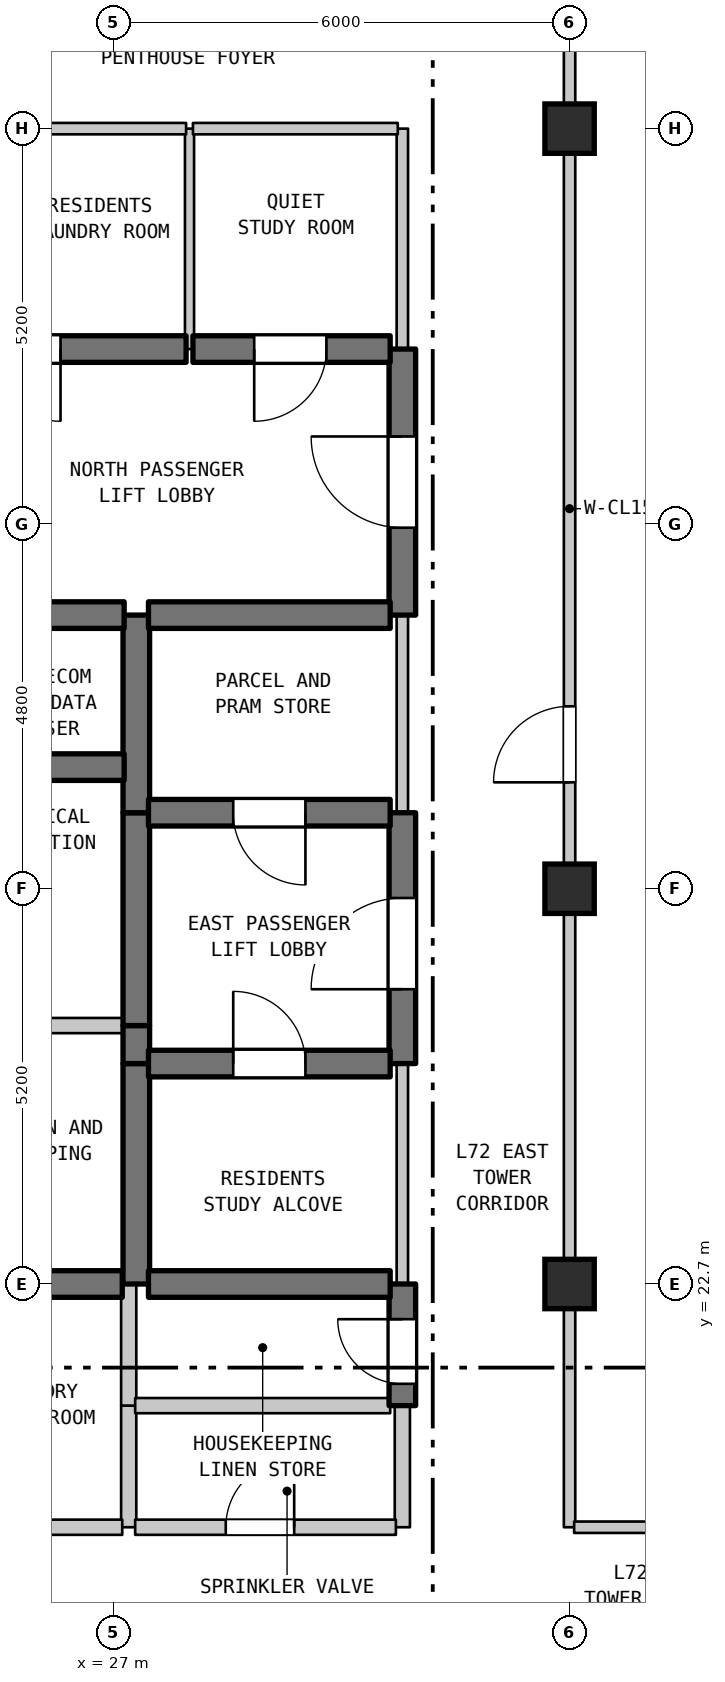
"""IFC4 building model, lengths in metres.
Left out: names, types, materials, properties, quantities, classifications, styles, units other than length and angle.
Written with IfcOpenShell. Run it as: python <this file> out.ifc"""

import sys

from ifc_helpers import new_model, si_unit, direction, frame, frame_2d, origin, origin_2d, place, context, subcontext, project, spatial, rectangle, extrude, element, fill, save


model = new_model("IFC4")
c1 = context("Model", 3, precision=1e-05, world=origin(), true_north=direction((0.0, 1.0)))
c2 = subcontext(c1, "Body", "Model", "MODEL_VIEW")
j1 = project(units=[si_unit("LENGTHUNIT", "METRE"), si_unit("PLANEANGLEUNIT", "RADIAN")], contexts=[c1])
p1 = place(None, origin())
s1 = spatial("IfcSite", under=j1, at=p1, CompositionType="ELEMENT")
p2 = place(p1, origin())
s2 = spatial("IfcBuilding", under=s1, at=p2, CompositionType="ELEMENT")
p3 = place(p2, frame((0.0, 0.0, 288.0)))
s3 = spatial("IfcBuildingStorey", under=s2, at=p3, CompositionType="ELEMENT", Elevation=288.0)
for number, where, z_axis, x_axis in (
    (1, (33.0, 22.7, 0.0), (0.0, 0.0, 1.0), (1.0, 0.0, 0.0)),
    (2, (33.0, 27.9, 0.0), (0.0, 0.0, 1.0), (1.0, 0.0, 0.0)),
    (3, (33.0, 37.9, 0.0), (0.0, 0.0, 1.0), (1.0, 0.0, 0.0)),
):
    element("IfcColumn", number, at=place(p3, frame(where, z_axis=z_axis, x_axis=x_axis)), inside=s3, PredefinedType="COLUMN", context=c2, shape_type="SweptSolid", body=[
        extrude(rectangle(XDim=0.65, YDim=0.65, at=origin_2d()), origin(), (0.0, 0.0, 1.0), 3.7),
    ])
p4 = place(p3, frame((27.2, 19.5, 0.0), z_axis=(0.0, 0.0, 1.0), x_axis=(0.0, 1.0, 0.0)))
e4 = element("IfcWall", 4, at=p4, inside=s3, PredefinedType="STANDARD", context=c2, shape_type="SweptSolid", body=[
    extrude(rectangle(XDim=1.6, YDim=0.2, at=frame_2d((0.8, 0.0))), origin(), (0.0, 0.0, 1.0), 3.39),
])
p5 = place(p3, frame((27.2, 21.1, 0.0), z_axis=(0.0, 0.0, 1.0), x_axis=(0.0, 1.0, 0.0)))
e5 = element("IfcWall", 5, at=p5, inside=s3, PredefinedType="STANDARD", context=c2, shape_type="SweptSolid", body=[
    extrude(rectangle(XDim=1.6, YDim=0.2, at=frame_2d((0.8, 0.0))), origin(), (0.0, 0.0, 1.0), 3.39),
])
p6 = place(p3, frame((27.3, 22.7, 0.0), z_axis=(0.0, 0.0, 1.0), x_axis=(0.0, 1.0, 0.0)))
e6 = element("IfcWall", 6, at=p6, inside=s3, PredefinedType="SHEAR", context=c2, shape_type="SweptSolid", body=[
    extrude(rectangle(XDim=2.9, YDim=0.35, at=frame_2d((1.45, 0.0))), origin(), (0.0, 0.0, 1.0), 3.39),
])
p7 = place(p3, frame((27.3, 25.6, 0.0), z_axis=(0.0, 0.0, 1.0), x_axis=(0.0, 1.0, 0.0)))
e7 = element("IfcWall", 7, at=p7, inside=s3, PredefinedType="SHEAR", context=c2, shape_type="SweptSolid", body=[
    extrude(rectangle(XDim=0.5, YDim=0.35, at=frame_2d((0.25, 0.0))), origin(), (0.0, 0.0, 1.0), 3.39),
])
p8 = place(p3, frame((27.3, 26.1, 0.0), z_axis=(0.0, 0.0, 1.0), x_axis=(0.0, 1.0, 0.0)))
e8 = element("IfcWall", 8, at=p8, inside=s3, PredefinedType="SHEAR", context=c2, shape_type="SweptSolid", body=[
    extrude(rectangle(XDim=2.8, YDim=0.35, at=frame_2d((1.4, 0.0))), origin(), (0.0, 0.0, 1.0), 3.39),
])
p9 = place(p3, frame((27.3, 28.9, 0.0), z_axis=(0.0, 0.0, 1.0), x_axis=(0.0, 1.0, 0.0)))
e9 = element("IfcWall", 9, at=p9, inside=s3, PredefinedType="SHEAR", context=c2, shape_type="SweptSolid", body=[
    extrude(rectangle(XDim=2.6, YDim=0.35, at=frame_2d((1.3, 0.0))), origin(), (0.0, 0.0, 1.0), 3.39),
])
p10 = place(p3, frame((28.0, 35.0, 0.0), z_axis=(0.0, 0.0, 1.0), x_axis=(0.0, 1.0, 0.0)))
e10 = element("IfcWall", 10, at=p10, inside=s3, PredefinedType="PARTITIONING", context=c2, shape_type="SweptSolid", body=[
    extrude(rectangle(XDim=2.9, YDim=0.12, at=frame_2d((1.45, 0.0))), origin(), (0.0, 0.0, 1.0), 3.39),
])
p11 = place(p3, frame((30.8, 19.5, 0.0), z_axis=(0.0, 0.0, 1.0), x_axis=(0.0, 1.0, 0.0)))
e11 = element("IfcWall", 11, at=p11, inside=s3, PredefinedType="STANDARD", context=c2, shape_type="SweptSolid", body=[
    extrude(rectangle(XDim=1.6, YDim=0.2, at=frame_2d((0.8, 0.0))), origin(), (0.0, 0.0, 1.0), 3.39),
])
p12 = place(p3, frame((30.8, 21.1, 0.0), z_axis=(0.0, 0.0, 1.0), x_axis=(0.0, 1.0, 0.0)))
e12 = element("IfcWall", 12, at=p12, inside=s3, PredefinedType="SHEAR", context=c2, shape_type="SweptSolid", body=[
    extrude(rectangle(XDim=1.6, YDim=0.35, at=frame_2d((0.8, 0.0))), origin(), (0.0, 0.0, 1.0), 3.39),
])
p13 = place(p12, frame((0.287, 0.0, 0.0)))
e13 = element("IfcOpeningElement", 13, at=p13, cuts=e12, PredefinedType="OPENING", context=c2, shape_type="SweptSolid", body=[
    extrude(rectangle(XDim=0.85, YDim=2.1, at=frame_2d((0.425, 1.05))), frame((0.0, 0.185, 0.0), z_axis=(0.0, -1.0, 0.0), x_axis=(1.0, 0.0, 0.0)), (0.0, 0.0, 1.0), 0.37),
])
p14 = place(p3, frame((30.8, 22.7, 0.0), z_axis=(0.0, 0.0, 1.0), x_axis=(0.0, 1.0, 0.0)))
e14 = element("IfcWall", 14, at=p14, inside=s3, PredefinedType="STANDARD", context=c2, shape_type="SweptSolid", body=[
    extrude(rectangle(XDim=2.9, YDim=0.15, at=frame_2d((1.45, 0.0))), origin(), (0.0, 0.0, 1.0), 3.39),
])
p15 = place(p3, frame((30.8, 25.6, 0.0), z_axis=(0.0, 0.0, 1.0), x_axis=(0.0, 1.0, 0.0)))
e15 = element("IfcWall", 15, at=p15, inside=s3, PredefinedType="SHEAR", context=c2, shape_type="SweptSolid", body=[
    extrude(rectangle(XDim=3.3, YDim=0.35, at=frame_2d((1.65, 0.0))), origin(), (0.0, 0.0, 1.0), 3.39),
])
p16 = place(p15, frame((0.978, 0.0, 0.0)))
e16 = element("IfcOpeningElement", 16, at=p16, cuts=e15, PredefinedType="OPENING", context=c2, shape_type="SweptSolid", body=[
    extrude(rectangle(XDim=1.2, YDim=2.2, at=frame_2d((0.6, 1.1))), frame((0.0, 0.185, 0.0), z_axis=(0.0, -1.0, 0.0), x_axis=(1.0, 0.0, 0.0)), (0.0, 0.0, 1.0), 0.37),
])
p17 = place(p3, frame((30.8, 28.9, 0.0), z_axis=(0.0, 0.0, 1.0), x_axis=(0.0, 1.0, 0.0)))
e17 = element("IfcWall", 17, at=p17, inside=s3, PredefinedType="STANDARD", context=c2, shape_type="SweptSolid", body=[
    extrude(rectangle(XDim=2.6, YDim=0.15, at=frame_2d((1.3, 0.0))), origin(), (0.0, 0.0, 1.0), 3.39),
])
p18 = place(p3, frame((30.8, 31.5, 0.0), z_axis=(0.0, 0.0, 1.0), x_axis=(0.0, 1.0, 0.0)))
e18 = element("IfcWall", 18, at=p18, inside=s3, PredefinedType="SHEAR", context=c2, shape_type="SweptSolid", body=[
    extrude(rectangle(XDim=3.5, YDim=0.35, at=frame_2d((1.75, 0.0))), origin(), (0.0, 0.0, 1.0), 3.39),
])
p19 = place(p18, frame((1.15, 0.0, 0.0)))
e19 = element("IfcOpeningElement", 19, at=p19, cuts=e18, PredefinedType="OPENING", context=c2, shape_type="SweptSolid", body=[
    extrude(rectangle(XDim=1.2, YDim=2.2, at=frame_2d((0.6, 1.1))), frame((0.0, 0.185, 0.0), z_axis=(0.0, -1.0, 0.0), x_axis=(1.0, 0.0, 0.0)), (0.0, 0.0, 1.0), 0.37),
])
p20 = place(p3, frame((30.8, 35.0, 0.0), z_axis=(0.0, 0.0, 1.0), x_axis=(0.0, 1.0, 0.0)))
e20 = element("IfcWall", 20, at=p20, inside=s3, PredefinedType="STANDARD", context=c2, shape_type="SweptSolid", body=[
    extrude(rectangle(XDim=2.9, YDim=0.15, at=frame_2d((1.45, 0.0))), origin(), (0.0, 0.0, 1.0), 3.39),
])
p21 = place(p3, frame((33.0, 19.5, 0.0), z_axis=(0.0, 0.0, 1.0), x_axis=(0.0, 1.0, 0.0)))
e21 = element("IfcWall", 21, at=p21, inside=s3, PredefinedType="STANDARD", context=c2, shape_type="SweptSolid", body=[
    extrude(rectangle(XDim=8.4, YDim=0.15, at=frame_2d((4.2, 0.0))), origin(), (0.0, 0.0, 1.0), 3.1),
])
p22 = place(p3, frame((23.96, 19.5, 0.0), z_axis=(0.0, 0.0, 1.0), x_axis=(1.0, 0.0, 0.0)))
e22 = element("IfcWall", 22, at=p22, inside=s3, PredefinedType="STANDARD", context=c2, shape_type="SweptSolid", body=[
    extrude(rectangle(XDim=3.155, YDim=0.2, at=frame_2d((1.578, 0.0))), origin(), (0.0, 0.0, 1.0), 3.39),
])
p23 = place(p22, frame((0.991, 0.0, 0.0)))
e23 = element("IfcOpeningElement", 23, at=p23, cuts=e22, PredefinedType="OPENING", context=c2, shape_type="SweptSolid", body=[
    extrude(rectangle(XDim=0.95, YDim=2.15, at=frame_2d((0.475, 1.075))), frame((0.0, 0.11, 0.0), z_axis=(0.0, -1.0, 0.0), x_axis=(1.0, 0.0, 0.0)), (0.0, 0.0, 1.0), 0.22),
])
p24 = place(p3, frame((27.285, 19.5, 0.0), z_axis=(0.0, 0.0, 1.0), x_axis=(1.0, 0.0, 0.0)))
e24 = element("IfcWall", 24, at=p24, inside=s3, PredefinedType="STANDARD", context=c2, shape_type="SweptSolid", body=[
    extrude(rectangle(XDim=3.43, YDim=0.2, at=frame_2d((1.715, 0.0))), origin(), (0.0, 0.0, 1.0), 3.39),
])
p25 = place(p24, frame((1.192, 0.0, 0.0)))
e25 = element("IfcOpeningElement", 25, at=p25, cuts=e24, PredefinedType="OPENING", context=c2, shape_type="SweptSolid", body=[
    extrude(rectangle(XDim=0.9, YDim=2.15, at=frame_2d((0.45, 1.075))), frame((0.0, 0.11, 0.0), z_axis=(0.0, -1.0, 0.0), x_axis=(1.0, 0.0, 0.0)), (0.0, 0.0, 1.0), 0.22),
])
p26 = place(p3, frame((33.06, 19.5, 0.0), z_axis=(0.0, 0.0, 1.0), x_axis=(1.0, 0.0, 0.0)))
e26 = element("IfcWall", 26, at=p26, inside=s3, PredefinedType="STANDARD", context=c2, shape_type="SweptSolid", body=[
    extrude(rectangle(XDim=8.323, YDim=0.15, at=frame_2d((4.162, 0.0))), origin(), (0.0, 0.0, 1.0), 3.39),
])
p27 = place(p26, frame((3.583, 0.0, 0.0)))
e27 = element("IfcOpeningElement", 27, at=p27, cuts=e26, PredefinedType="OPENING", context=c2, shape_type="SweptSolid", body=[
    extrude(rectangle(XDim=1.0, YDim=2.15, at=frame_2d((0.5, 1.075))), frame((0.0, 0.085, 0.0), z_axis=(0.0, -1.0, 0.0), x_axis=(1.0, 0.0, 0.0)), (0.0, 0.0, 1.0), 0.17),
])
p28 = place(p3, frame((27.285, 21.1, 0.0), z_axis=(0.0, 0.0, 1.0), x_axis=(1.0, 0.0, 0.0)))
e28 = element("IfcWall", 28, at=p28, inside=s3, PredefinedType="STANDARD", context=c2, shape_type="SweptSolid", body=[
    extrude(rectangle(XDim=3.355, YDim=0.2, at=frame_2d((1.677, 0.0))), origin(), (0.0, 0.0, 1.0), 3.39),
])
p29 = place(p3, frame((23.96, 22.7, 0.0), z_axis=(0.0, 0.0, 1.0), x_axis=(1.0, 0.0, 0.0)))
e29 = element("IfcWall", 29, at=p29, inside=s3, PredefinedType="SHEAR", context=c2, shape_type="SweptSolid", body=[
    extrude(rectangle(XDim=3.155, YDim=0.35, at=frame_2d((1.578, 0.0))), origin(), (0.0, 0.0, 1.0), 3.39),
])
p30 = place(p3, frame((27.46, 22.7, 0.0), z_axis=(0.0, 0.0, 1.0), x_axis=(1.0, 0.0, 0.0)))
e30 = element("IfcWall", 30, at=p30, inside=s3, PredefinedType="SHEAR", context=c2, shape_type="SweptSolid", body=[
    extrude(rectangle(XDim=3.18, YDim=0.35, at=frame_2d((1.59, 0.0))), origin(), (0.0, 0.0, 1.0), 3.39),
])
p31 = place(p3, frame((27.46, 25.6, 0.0), z_axis=(0.0, 0.0, 1.0), x_axis=(1.0, 0.0, 0.0)))
e31 = element("IfcWall", 31, at=p31, inside=s3, PredefinedType="SHEAR", context=c2, shape_type="SweptSolid", body=[
    extrude(rectangle(XDim=3.18, YDim=0.35, at=frame_2d((1.59, 0.0))), origin(), (0.0, 0.0, 1.0), 3.39),
])
p32 = place(p31, frame((1.115, 0.0, 0.0)))
e32 = element("IfcOpeningElement", 32, at=p32, cuts=e31, PredefinedType="OPENING", context=c2, shape_type="SweptSolid", body=[
    extrude(rectangle(XDim=0.95, YDim=2.15, at=frame_2d((0.475, 1.075))), frame((0.0, 0.185, 0.0), z_axis=(0.0, -1.0, 0.0), x_axis=(1.0, 0.0, 0.0)), (0.0, 0.0, 1.0), 0.37),
])
p33 = place(p3, frame((23.96, 26.1, 0.0), z_axis=(0.0, 0.0, 1.0), x_axis=(1.0, 0.0, 0.0)))
e33 = element("IfcWall", 33, at=p33, inside=s3, PredefinedType="STANDARD", context=c2, shape_type="SweptSolid", body=[
    extrude(rectangle(XDim=3.18, YDim=0.2, at=frame_2d((1.59, 0.0))), origin(), (0.0, 0.0, 1.0), 3.39),
])
p34 = place(p3, frame((27.46, 28.9, 0.0), z_axis=(0.0, 0.0, 1.0), x_axis=(1.0, 0.0, 0.0)))
e34 = element("IfcWall", 34, at=p34, inside=s3, PredefinedType="SHEAR", context=c2, shape_type="SweptSolid", body=[
    extrude(rectangle(XDim=3.18, YDim=0.35, at=frame_2d((1.59, 0.0))), origin(), (0.0, 0.0, 1.0), 3.39),
])
p35 = place(p34, frame((1.115, 0.0, 0.0)))
e35 = element("IfcOpeningElement", 35, at=p35, cuts=e34, PredefinedType="OPENING", context=c2, shape_type="SweptSolid", body=[
    extrude(rectangle(XDim=0.95, YDim=2.15, at=frame_2d((0.475, 1.075))), frame((0.0, 0.185, 0.0), z_axis=(0.0, -1.0, 0.0), x_axis=(1.0, 0.0, 0.0)), (0.0, 0.0, 1.0), 0.37),
])
p36 = place(p3, frame((23.96, 29.5, 0.0), z_axis=(0.0, 0.0, 1.0), x_axis=(1.0, 0.0, 0.0)))
e36 = element("IfcWall", 36, at=p36, inside=s3, PredefinedType="SHEAR", context=c2, shape_type="SweptSolid", body=[
    extrude(rectangle(XDim=3.18, YDim=0.35, at=frame_2d((1.59, 0.0))), origin(), (0.0, 0.0, 1.0), 3.39),
])
p37 = place(p3, frame((23.96, 31.5, 0.0), z_axis=(0.0, 0.0, 1.0), x_axis=(1.0, 0.0, 0.0)))
e37 = element("IfcWall", 37, at=p37, inside=s3, PredefinedType="SHEAR", context=c2, shape_type="SweptSolid", body=[
    extrude(rectangle(XDim=3.18, YDim=0.35, at=frame_2d((1.59, 0.0))), origin(), (0.0, 0.0, 1.0), 3.39),
])
p38 = place(p37, frame((1.094, 0.0, 0.0)))
e38 = element("IfcOpeningElement", 38, at=p38, cuts=e37, PredefinedType="OPENING", context=c2, shape_type="SweptSolid", body=[
    extrude(rectangle(XDim=0.85, YDim=2.1, at=frame_2d((0.425, 1.05))), frame((0.0, 0.185, 0.0), z_axis=(0.0, -1.0, 0.0), x_axis=(1.0, 0.0, 0.0)), (0.0, 0.0, 1.0), 0.37),
])
p39 = place(p3, frame((27.46, 31.5, 0.0), z_axis=(0.0, 0.0, 1.0), x_axis=(1.0, 0.0, 0.0)))
e39 = element("IfcWall", 39, at=p39, inside=s3, PredefinedType="SHEAR", context=c2, shape_type="SweptSolid", body=[
    extrude(rectangle(XDim=3.18, YDim=0.35, at=frame_2d((1.59, 0.0))), origin(), (0.0, 0.0, 1.0), 3.39),
])
p40 = place(p3, frame((23.96, 35.0, 0.0), z_axis=(0.0, 0.0, 1.0), x_axis=(1.0, 0.0, 0.0)))
e40 = element("IfcWall", 40, at=p40, inside=s3, PredefinedType="SHEAR", context=c2, shape_type="SweptSolid", body=[
    extrude(rectangle(XDim=3.995, YDim=0.35, at=frame_2d((1.998, 0.0))), origin(), (0.0, 0.0, 1.0), 3.39),
])
p41 = place(p40, frame((1.393, 0.0, 0.0)))
e41 = element("IfcOpeningElement", 41, at=p41, cuts=e40, PredefinedType="OPENING", context=c2, shape_type="SweptSolid", body=[
    extrude(rectangle(XDim=0.95, YDim=2.15, at=frame_2d((0.475, 1.075))), frame((0.0, 0.185, 0.0), z_axis=(0.0, -1.0, 0.0), x_axis=(1.0, 0.0, 0.0)), (0.0, 0.0, 1.0), 0.37),
])
p42 = place(p3, frame((28.045, 35.0, 0.0), z_axis=(0.0, 0.0, 1.0), x_axis=(1.0, 0.0, 0.0)))
e42 = element("IfcWall", 42, at=p42, inside=s3, PredefinedType="SHEAR", context=c2, shape_type="SweptSolid", body=[
    extrude(rectangle(XDim=2.595, YDim=0.35, at=frame_2d((1.297, 0.0))), origin(), (0.0, 0.0, 1.0), 3.39),
])
p43 = place(p42, frame((0.806, 0.0, 0.0)))
e43 = element("IfcOpeningElement", 43, at=p43, cuts=e42, PredefinedType="OPENING", context=c2, shape_type="SweptSolid", body=[
    extrude(rectangle(XDim=0.95, YDim=2.15, at=frame_2d((0.475, 1.075))), frame((0.0, 0.185, 0.0), z_axis=(0.0, -1.0, 0.0), x_axis=(1.0, 0.0, 0.0)), (0.0, 0.0, 1.0), 0.37),
])
p44 = place(p3, frame((23.96, 37.9, 0.0), z_axis=(0.0, 0.0, 1.0), x_axis=(1.0, 0.0, 0.0)))
e44 = element("IfcWall", 44, at=p44, inside=s3, PredefinedType="STANDARD", context=c2, shape_type="SweptSolid", body=[
    extrude(rectangle(XDim=3.995, YDim=0.15, at=frame_2d((1.998, 0.0))), origin(), (0.0, 0.0, 1.0), 2.89),
])
p45 = place(p3, frame((28.045, 37.9, 0.0), z_axis=(0.0, 0.0, 1.0), x_axis=(1.0, 0.0, 0.0)))
e45 = element("IfcWall", 45, at=p45, inside=s3, PredefinedType="STANDARD", context=c2, shape_type="SweptSolid", body=[
    extrude(rectangle(XDim=2.695, YDim=0.15, at=frame_2d((1.348, 0.0))), origin(), (0.0, 0.0, 1.0), 2.89),
])
p46 = place(p3, frame((33.0, 27.9, 0.0), z_axis=(0.0, 0.0, 1.0), x_axis=(0.0, 1.0, 0.0)))
e46 = element("IfcWall", 46, at=p46, inside=s3, PredefinedType="STANDARD", context=c2, shape_type="SweptSolid", body=[
    extrude(rectangle(XDim=10.0, YDim=0.15, at=frame_2d((5.0, 0.0))), origin(), (0.0, 0.0, 1.0), 2.89),
])
p47 = place(p46, frame((1.4, 0.0, 0.0)))
e47 = element("IfcOpeningElement", 47, at=p47, cuts=e46, PredefinedType="OPENING", context=c2, shape_type="SweptSolid", body=[
    extrude(rectangle(XDim=1.0, YDim=2.15, at=frame_2d((0.5, 1.075))), frame((0.0, 0.085, 0.0), z_axis=(0.0, -1.0, 0.0), x_axis=(1.0, 0.0, 0.0)), (0.0, 0.0, 1.0), 0.17),
])
p48 = place(p3, frame((33.0, 37.9, 0.0), z_axis=(0.0, 0.0, 1.0), x_axis=(0.0, 1.0, 0.0)))
e48 = element("IfcWall", 48, at=p48, inside=s3, PredefinedType="STANDARD", context=c2, shape_type="SweptSolid", body=[
    extrude(rectangle(XDim=2.2, YDim=0.15, at=frame_2d((1.1, 0.0))), origin(), (0.0, 0.0, 1.0), 2.79),
])
p49 = place(p13, origin())
e49 = element("IfcDoor", 49, at=p49, inside=s3, OperationType="SINGLE_SWING_RIGHT", PredefinedType="DOOR", context=c2, shape_type="SweptSolid", body=[
    extrude(rectangle(XDim=0.85, YDim=2.1, at=frame_2d((0.425, 1.05))), frame((0.0, 0.025, 0.0), z_axis=(0.0, -1.0, 0.0), x_axis=(1.0, 0.0, 0.0)), (0.0, 0.0, 1.0), 0.05),
])
fill(e13, e49)
p50 = place(p16, origin())
e50 = element("IfcDoor", 50, at=p50, inside=s3, OperationType="SINGLE_SWING_LEFT", PredefinedType="DOOR", context=c2, shape_type="SweptSolid", body=[
    extrude(rectangle(XDim=1.2, YDim=2.2, at=frame_2d((0.6, 1.1))), frame((0.0, 0.025, 0.0), z_axis=(0.0, -1.0, 0.0), x_axis=(1.0, 0.0, 0.0)), (0.0, 0.0, 1.0), 0.05),
])
fill(e16, e50)
p51 = place(p19, origin())
e51 = element("IfcDoor", 51, at=p51, inside=s3, OperationType="SINGLE_SWING_RIGHT", PredefinedType="DOOR", context=c2, shape_type="SweptSolid", body=[
    extrude(rectangle(XDim=1.2, YDim=2.2, at=frame_2d((0.6, 1.1))), frame((0.0, 0.025, 0.0), z_axis=(0.0, -1.0, 0.0), x_axis=(1.0, 0.0, 0.0)), (0.0, 0.0, 1.0), 0.05),
])
fill(e19, e51)
p52 = place(p47, origin())
e52 = element("IfcDoor", 52, at=p52, inside=s3, OperationType="SINGLE_SWING_LEFT", PredefinedType="DOOR", context=c2, shape_type="SweptSolid", body=[
    extrude(rectangle(XDim=1.0, YDim=2.15, at=frame_2d((0.5, 1.075))), frame((0.0, 0.025, 0.0), z_axis=(0.0, -1.0, 0.0), x_axis=(1.0, 0.0, 0.0)), (0.0, 0.0, 1.0), 0.05),
])
fill(e47, e52)
p53 = place(p25, origin())
e53 = element("IfcDoor", 53, at=p53, inside=s3, OperationType="SINGLE_SWING_RIGHT", PredefinedType="DOOR", context=c2, shape_type="SweptSolid", body=[
    extrude(rectangle(XDim=0.9, YDim=2.15, at=frame_2d((0.45, 1.075))), frame((0.0, 0.025, 0.0), z_axis=(0.0, -1.0, 0.0), x_axis=(1.0, 0.0, 0.0)), (0.0, 0.0, 1.0), 0.05),
])
fill(e25, e53)
p54 = place(p32, origin())
e54 = element("IfcDoor", 54, at=p54, inside=s3, OperationType="SINGLE_SWING_LEFT", PredefinedType="DOOR", context=c2, shape_type="SweptSolid", body=[
    extrude(rectangle(XDim=0.95, YDim=2.15, at=frame_2d((0.475, 1.075))), frame((0.0, 0.025, 0.0), z_axis=(0.0, -1.0, 0.0), x_axis=(1.0, 0.0, 0.0)), (0.0, 0.0, 1.0), 0.05),
])
fill(e32, e54)
p55 = place(p35, frame((0.95, 0.0, 0.0), z_axis=(0.0, 0.0, 1.0), x_axis=(-1.0, 0.0, 0.0)))
e55 = element("IfcDoor", 55, at=p55, inside=s3, OperationType="SINGLE_SWING_RIGHT", PredefinedType="DOOR", context=c2, shape_type="SweptSolid", body=[
    extrude(rectangle(XDim=0.95, YDim=2.15, at=frame_2d((0.475, 1.075))), frame((0.0, 0.025, 0.0), z_axis=(0.0, -1.0, 0.0), x_axis=(1.0, 0.0, 0.0)), (0.0, 0.0, 1.0), 0.05),
])
fill(e35, e55)
p56 = place(p41, frame((0.95, 0.0, 0.0), z_axis=(0.0, 0.0, 1.0), x_axis=(-1.0, 0.0, 0.0)))
e56 = element("IfcDoor", 56, at=p56, inside=s3, OperationType="SINGLE_SWING_RIGHT", PredefinedType="DOOR", context=c2, shape_type="SweptSolid", body=[
    extrude(rectangle(XDim=0.95, YDim=2.15, at=frame_2d((0.475, 1.075))), frame((0.0, 0.025, 0.0), z_axis=(0.0, -1.0, 0.0), x_axis=(1.0, 0.0, 0.0)), (0.0, 0.0, 1.0), 0.05),
])
fill(e41, e56)
p57 = place(p43, frame((0.95, 0.0, 0.0), z_axis=(0.0, 0.0, 1.0), x_axis=(-1.0, 0.0, 0.0)))
e57 = element("IfcDoor", 57, at=p57, inside=s3, OperationType="SINGLE_SWING_LEFT", PredefinedType="DOOR", context=c2, shape_type="SweptSolid", body=[
    extrude(rectangle(XDim=0.95, YDim=2.15, at=frame_2d((0.475, 1.075))), frame((0.0, 0.025, 0.0), z_axis=(0.0, -1.0, 0.0), x_axis=(1.0, 0.0, 0.0)), (0.0, 0.0, 1.0), 0.05),
])
fill(e43, e57)
save(model, sys.argv[1])
